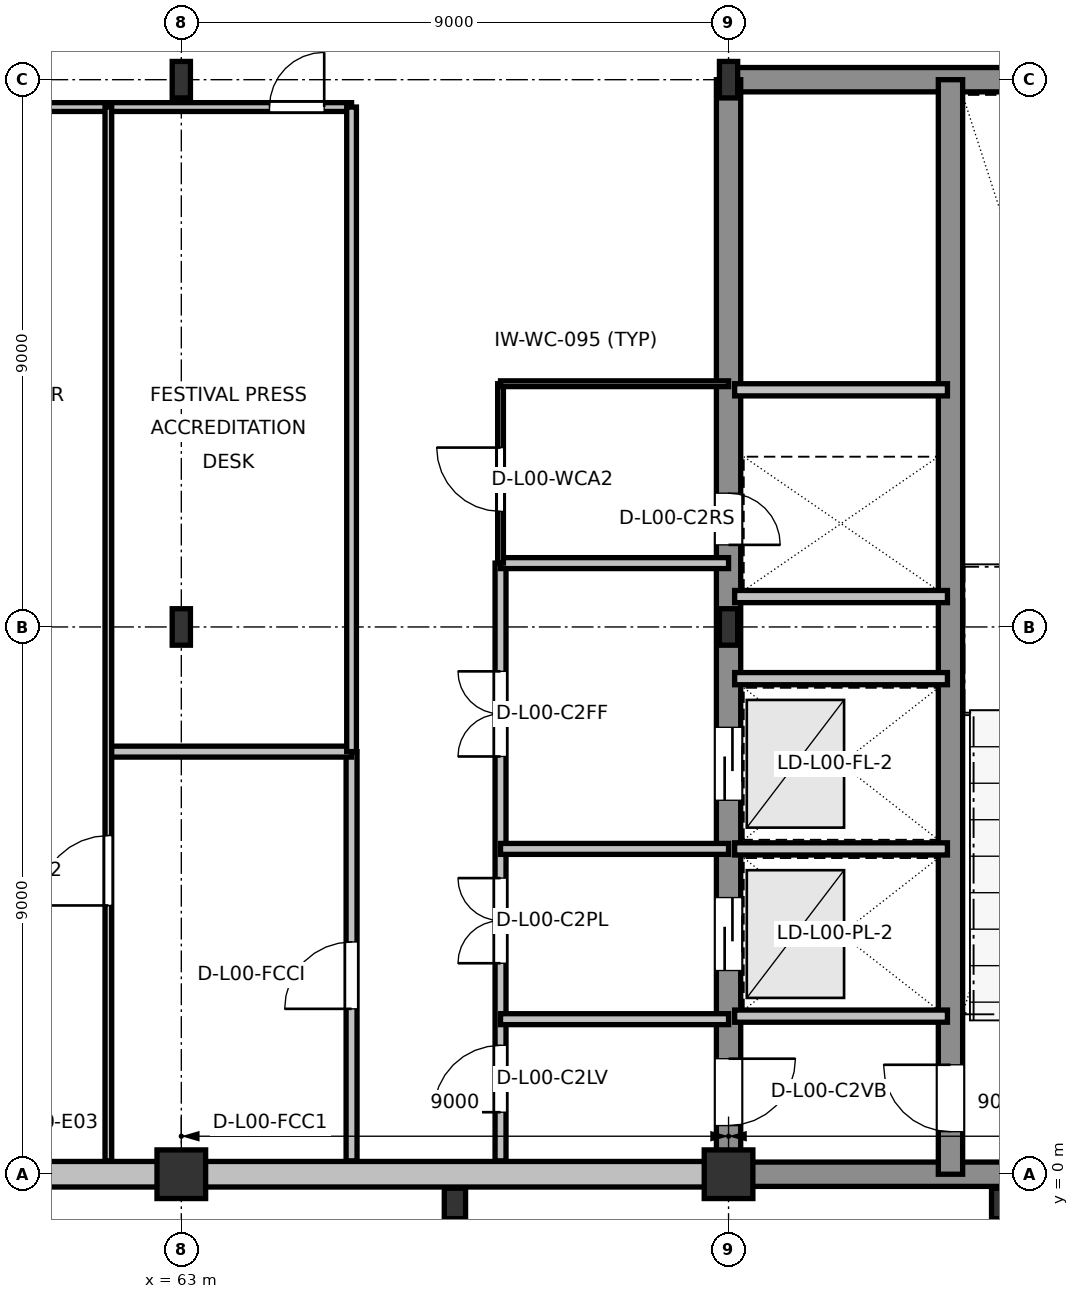
"""IFC4 building model, lengths in metres.
Left out: names, types, materials, properties, quantities, classifications, styles, units other than length and angle.
Written with IfcOpenShell. Run it as: python <this file> out.ifc"""

import sys

from ifc_helpers import new_model, si_unit, direction, frame, frame_2d, origin, origin_2d, place, context, subcontext, project, spatial, rectangle, i_section, extrude, element, fill, save


model = new_model("IFC4")
c1 = context("Model", 3, precision=1e-05, world=origin(), true_north=direction((0.0, 1.0)))
c2 = subcontext(c1, "Body", "Model", "MODEL_VIEW")
j1 = project(units=[si_unit("LENGTHUNIT", "METRE"), si_unit("PLANEANGLEUNIT", "RADIAN")], contexts=[c1])
p1 = place(None, origin())
s1 = spatial("IfcSite", under=j1, at=p1, CompositionType="ELEMENT")
p2 = place(p1, origin())
s2 = spatial("IfcBuilding", under=s1, at=p2, CompositionType="ELEMENT")
p3 = place(p2, origin())
s3 = spatial("IfcBuildingStorey", under=s2, at=p3, CompositionType="ELEMENT", Elevation=0.0)
for number, where, z_axis, x_axis in (
    (1, (67.5, -0.48, 0.0), (0.0, 0.0, 1.0), (1.0, 0.0, 0.0)),
    (2, (76.5, -0.48, 0.0), (0.0, 0.0, 1.0), (1.0, 0.0, 0.0)),
):
    element("IfcColumn", number, at=place(p3, frame(where, z_axis=z_axis, x_axis=x_axis)), inside=s3, PredefinedType="PILASTER", context=c2, shape_type="SweptSolid", body=[
        extrude(rectangle(XDim=0.35, YDim=0.5, at=origin_2d()), origin(), (0.0, 0.0, 1.0), 5.4),
    ])
p4 = place(p3, frame((63.0, 0.0, 0.0), z_axis=(0.0, 0.0, 1.0), x_axis=(1.0, 0.0, 0.0)))
e3 = element("IfcColumn", 3, at=p4, inside=s3, PredefinedType="COLUMN", context=c2, shape_type="SweptSolid", body=[
    extrude(rectangle(XDim=0.8, YDim=0.8, at=origin_2d()), origin(), (0.0, 0.0, 1.0), 5.4),
])
for number, where, z_axis, x_axis in (
    (4, (63.0, 9.0, 0.0), (0.0, 0.0, 1.0), (1.0, 0.0, 0.0)),
    (5, (63.0, 18.0, 0.0), (0.0, 0.0, 1.0), (1.0, 0.0, 0.0)),
):
    element("IfcColumn", number, at=place(p3, frame(where, z_axis=z_axis, x_axis=x_axis)), inside=s3, PredefinedType="COLUMN", context=c2, shape_type="SweptSolid", body=[
        extrude(i_section(OverallWidth=0.3, OverallDepth=0.6, WebThickness=0.015, FlangeThickness=0.03, at=origin_2d()), origin(), (0.0, 0.0, 1.0), 5.4),
    ])
p5 = place(p3, frame((72.0, 0.0, 0.0), z_axis=(0.0, 0.0, 1.0), x_axis=(1.0, 0.0, 0.0)))
e6 = element("IfcColumn", 6, at=p5, inside=s3, PredefinedType="COLUMN", context=c2, shape_type="SweptSolid", body=[
    extrude(rectangle(XDim=0.8, YDim=0.8, at=origin_2d()), origin(), (0.0, 0.0, 1.0), 5.4),
])
for number, where, z_axis, x_axis in (
    (7, (72.0, 9.0, 0.0), (0.0, 0.0, 1.0), (1.0, 0.0, 0.0)),
    (8, (72.0, 18.0, 0.0), (0.0, 0.0, 1.0), (1.0, 0.0, 0.0)),
):
    element("IfcColumn", number, at=place(p3, frame(where, z_axis=z_axis, x_axis=x_axis)), inside=s3, PredefinedType="COLUMN", context=c2, shape_type="SweptSolid", body=[
        extrude(i_section(OverallWidth=0.3, OverallDepth=0.6, WebThickness=0.015, FlangeThickness=0.03, at=origin_2d()), origin(), (0.0, 0.0, 1.0), 5.4),
    ])
p6 = place(p3, frame((54.385, 0.0, 0.0), z_axis=(0.0, 0.0, 1.0), x_axis=(1.0, 0.0, 0.0)))
e9 = element("IfcWall", 9, at=p6, inside=s3, PredefinedType="STANDARD", context=c2, shape_type="SweptSolid", body=[
    extrude(rectangle(XDim=8.23, YDim=0.42, at=frame_2d((4.115, 0.0))), origin(), (0.0, 0.0, 1.0), 3.79),
])
p7 = place(p6, frame((5.465, 0.0, 0.0)))
e10 = element("IfcOpeningElement", 10, at=p7, cuts=e9, PredefinedType="OPENING", context=c2, shape_type="SweptSolid", body=[
    extrude(rectangle(XDim=1.9, YDim=2.5, at=frame_2d((0.95, 1.25))), frame((0.0, 0.22, 0.0), z_axis=(0.0, -1.0, 0.0), x_axis=(1.0, 0.0, 0.0)), (0.0, 0.0, 1.0), 0.44),
])
p8 = place(p3, frame((63.385, 0.0, 0.0), z_axis=(0.0, 0.0, 1.0), x_axis=(1.0, 0.0, 0.0)))
e11 = element("IfcWall", 11, at=p8, inside=s3, PredefinedType="STANDARD", context=c2, shape_type="SweptSolid", body=[
    extrude(rectangle(XDim=8.23, YDim=0.42, at=frame_2d((4.115, 0.0))), origin(), (0.0, 0.0, 1.0), 4.795),
])
p9 = place(p8, frame((0.45, 0.0, 0.0)))
e12 = element("IfcOpeningElement", 12, at=p9, cuts=e11, PredefinedType="OPENING", context=c2, shape_type="SweptSolid", body=[
    extrude(rectangle(XDim=1.25, YDim=2.2, at=frame_2d((0.625, 1.1))), frame((0.0, 0.22, 0.0), z_axis=(0.0, -1.0, 0.0), x_axis=(1.0, 0.0, 0.0)), (0.0, 0.0, 1.0), 0.44),
])
p10 = place(p3, frame((72.0, 0.0, 0.0), z_axis=(0.0, 0.0, 1.0), x_axis=(1.0, 0.0, 0.0)))
e13 = element("IfcWall", 13, at=p10, inside=s3, PredefinedType="SHEAR", context=c2, shape_type="SweptSolid", body=[
    extrude(rectangle(XDim=9.0, YDim=0.4, at=frame_2d((4.5, 0.0))), origin(), (0.0, 0.0, 1.0), 5.16),
])
p11 = place(p10, frame((5.4, 0.0, 0.0)))
e14 = element("IfcOpeningElement", 14, at=p11, cuts=e13, PredefinedType="OPENING", context=c2, shape_type="SweptSolid", body=[
    extrude(rectangle(XDim=1.8, YDim=2.35, at=frame_2d((0.9, 1.175))), frame((0.0, 0.21, 0.0), z_axis=(0.0, -1.0, 0.0), x_axis=(1.0, 0.0, 0.0)), (0.0, 0.0, 1.0), 0.42),
])
p12 = place(p3, frame((81.0, 18.0, 0.0), z_axis=(0.0, 0.0, 1.0), x_axis=(-1.0, 0.0, 0.0)))
e15 = element("IfcWall", 15, at=p12, inside=s3, PredefinedType="SHEAR", context=c2, shape_type="SweptSolid", body=[
    extrude(rectangle(XDim=9.0, YDim=0.4, at=frame_2d((4.5, 0.0))), origin(), (0.0, 0.0, 1.0), 5.16),
])
p13 = place(p3, frame((72.0, 18.0, 0.0), z_axis=(0.0, 0.0, 1.0), x_axis=(0.0, -1.0, 0.0)))
e16 = element("IfcWall", 16, at=p13, inside=s3, PredefinedType="SHEAR", context=c2, shape_type="SweptSolid", body=[
    extrude(rectangle(XDim=18.0, YDim=0.4, at=frame_2d((9.0, 0.0))), origin(), (0.0, 0.0, 1.0), 5.16),
])
p14 = place(p13, frame((16.1, 0.0, 0.0)))
e17 = element("IfcOpeningElement", 17, at=p14, cuts=e16, PredefinedType="OPENING", context=c2, shape_type="SweptSolid", body=[
    extrude(rectangle(XDim=1.1, YDim=2.16, at=frame_2d((0.55, 1.08))), frame((0.0, 0.21, 0.0), z_axis=(0.0, -1.0, 0.0), x_axis=(1.0, 0.0, 0.0)), (0.0, 0.0, 1.0), 0.42),
])
p15 = place(p13, frame((13.45, 0.0, 0.0)))
e18 = element("IfcOpeningElement", 18, at=p15, cuts=e16, PredefinedType="OPENING", context=c2, shape_type="SweptSolid", body=[
    extrude(rectangle(XDim=1.2, YDim=2.2, at=frame_2d((0.6, 1.1))), frame((0.0, 0.21, 0.0), z_axis=(0.0, -1.0, 0.0), x_axis=(1.0, 0.0, 0.0)), (0.0, 0.0, 1.0), 0.42),
])
p16 = place(p13, frame((10.65, 0.0, 0.0)))
e19 = element("IfcOpeningElement", 19, at=p16, cuts=e16, PredefinedType="OPENING", context=c2, shape_type="SweptSolid", body=[
    extrude(rectangle(XDim=1.2, YDim=2.2, at=frame_2d((0.6, 1.1))), frame((0.0, 0.21, 0.0), z_axis=(0.0, -1.0, 0.0), x_axis=(1.0, 0.0, 0.0)), (0.0, 0.0, 1.0), 0.42),
])
p17 = place(p13, frame((6.8, 0.0, 0.0)))
e20 = element("IfcOpeningElement", 20, at=p17, cuts=e16, PredefinedType="OPENING", context=c2, shape_type="SweptSolid", body=[
    extrude(rectangle(XDim=0.85, YDim=2.1, at=frame_2d((0.425, 1.05))), frame((0.0, 0.21, 0.0), z_axis=(0.0, -1.0, 0.0), x_axis=(1.0, 0.0, 0.0)), (0.0, 0.0, 1.0), 0.42),
])
p18 = place(p3, frame((75.65, 0.0, 0.0), z_axis=(0.0, 0.0, 1.0), x_axis=(0.0, 1.0, 0.0)))
e21 = element("IfcWall", 21, at=p18, inside=s3, PredefinedType="SHEAR", context=c2, shape_type="SweptSolid", body=[
    extrude(rectangle(XDim=18.0, YDim=0.4, at=frame_2d((9.0, 0.0))), origin(), (0.0, 0.0, 1.0), 5.16),
])
p19 = place(p18, frame((0.7, 0.0, 0.0)))
e22 = element("IfcOpeningElement", 22, at=p19, cuts=e21, PredefinedType="OPENING", context=c2, shape_type="SweptSolid", body=[
    extrude(rectangle(XDim=1.1, YDim=2.16, at=frame_2d((0.55, 1.08))), frame((0.0, 0.21, 0.0), z_axis=(0.0, -1.0, 0.0), x_axis=(1.0, 0.0, 0.0)), (0.0, 0.0, 1.0), 0.42),
])
for number, where, z_axis, x_axis in (
    (23, (72.1, 2.6, 0.0), (0.0, 0.0, 1.0), (1.0, 0.0, 0.0)),
    (24, (72.1, 5.35, 0.0), (0.0, 0.0, 1.0), (1.0, 0.0, 0.0)),
    (25, (72.1, 8.15, 0.0), (0.0, 0.0, 1.0), (1.0, 0.0, 0.0)),
    (26, (72.1, 9.5, 0.0), (0.0, 0.0, 1.0), (1.0, 0.0, 0.0)),
    (27, (72.1, 12.9, 0.0), (0.0, 0.0, 1.0), (1.0, 0.0, 0.0)),
):
    element("IfcWall", number, at=place(p3, frame(where, z_axis=z_axis, x_axis=x_axis)), inside=s3, PredefinedType="PARTITIONING", context=c2, shape_type="SweptSolid", body=[
        extrude(rectangle(XDim=3.5, YDim=0.2, at=frame_2d((1.75, 0.0))), origin(), (0.0, 0.0, 1.0), 5.16),
    ])
p20 = place(p3, frame((68.25, 0.22, 0.0), z_axis=(0.0, 0.0, 1.0), x_axis=(0.0, 1.0, 0.0)))
e28 = element("IfcWall", 28, at=p20, inside=s3, PredefinedType="PARTITIONING", context=c2, shape_type="SweptSolid", body=[
    extrude(rectangle(XDim=9.83, YDim=0.18, at=frame_2d((4.915, 0.0))), origin(), (0.0, 0.0, 1.0), 5.16),
])
p21 = place(p20, frame((0.8, 0.0, 0.0)))
e29 = element("IfcOpeningElement", 29, at=p21, cuts=e28, PredefinedType="OPENING", context=c2, shape_type="SweptSolid", body=[
    extrude(rectangle(XDim=1.1, YDim=2.16, at=frame_2d((0.55, 1.08))), frame((0.0, 0.1, 0.0), z_axis=(0.0, -1.0, 0.0), x_axis=(1.0, 0.0, 0.0)), (0.0, 0.0, 1.0), 0.2),
])
p22 = place(p20, frame((3.25, 0.0, 0.0)))
e30 = element("IfcOpeningElement", 30, at=p22, cuts=e28, PredefinedType="OPENING", context=c2, shape_type="SweptSolid", body=[
    extrude(rectangle(XDim=1.4, YDim=2.2, at=frame_2d((0.7, 1.1))), frame((0.0, 0.1, 0.0), z_axis=(0.0, -1.0, 0.0), x_axis=(1.0, 0.0, 0.0)), (0.0, 0.0, 1.0), 0.2),
])
p23 = place(p20, frame((6.65, 0.0, 0.0)))
e31 = element("IfcOpeningElement", 31, at=p23, cuts=e28, PredefinedType="OPENING", context=c2, shape_type="SweptSolid", body=[
    extrude(rectangle(XDim=1.4, YDim=2.2, at=frame_2d((0.7, 1.1))), frame((0.0, 0.1, 0.0), z_axis=(0.0, -1.0, 0.0), x_axis=(1.0, 0.0, 0.0)), (0.0, 0.0, 1.0), 0.2),
])
for number, where, z_axis, x_axis in (
    (32, (68.25, 2.55, 0.0), (0.0, 0.0, 1.0), (1.0, 0.0, 0.0)),
    (33, (68.25, 5.35, 0.0), (0.0, 0.0, 1.0), (1.0, 0.0, 0.0)),
    (34, (68.25, 10.05, 0.0), (0.0, 0.0, 1.0), (1.0, 0.0, 0.0)),
):
    element("IfcWall", number, at=place(p3, frame(where, z_axis=z_axis, x_axis=x_axis)), inside=s3, PredefinedType="PARTITIONING", context=c2, shape_type="SweptSolid", body=[
        extrude(rectangle(XDim=3.75, YDim=0.18, at=frame_2d((1.875, 0.0))), origin(), (0.0, 0.0, 1.0), 5.16),
    ])
p24 = place(p3, frame((68.25, 10.05, 0.0), z_axis=(0.0, 0.0, 1.0), x_axis=(0.0, 1.0, 0.0)))
e35 = element("IfcWall", 35, at=p24, inside=s3, PredefinedType="PARTITIONING", context=c2, shape_type="SweptSolid", body=[
    extrude(rectangle(XDim=2.95, YDim=0.095, at=frame_2d((1.475, 0.0))), origin(), (0.0, 0.0, 1.0), 5.16),
])
p25 = place(p24, frame((0.85, 0.0, 0.0)))
e36 = element("IfcOpeningElement", 36, at=p25, cuts=e35, PredefinedType="OPENING", context=c2, shape_type="SweptSolid", body=[
    extrude(rectangle(XDim=1.05, YDim=2.13, at=frame_2d((0.525, 1.065))), frame((0.0, 0.057, 0.0), z_axis=(0.0, -1.0, 0.0), x_axis=(1.0, 0.0, 0.0)), (0.0, 0.0, 1.0), 0.115),
])
p26 = place(p3, frame((68.25, 13.0, 0.0), z_axis=(0.0, 0.0, 1.0), x_axis=(1.0, 0.0, 0.0)))
e37 = element("IfcWall", 37, at=p26, inside=s3, PredefinedType="PARTITIONING", context=c2, shape_type="SweptSolid", body=[
    extrude(rectangle(XDim=3.75, YDim=0.095, at=frame_2d((1.875, 0.0))), origin(), (0.0, 0.0, 1.0), 5.16),
])
p27 = place(p3, frame((65.8, 0.22, 0.0), z_axis=(0.0, 0.0, 1.0), x_axis=(0.0, 1.0, 0.0)))
e38 = element("IfcWall", 38, at=p27, inside=s3, PredefinedType="PARTITIONING", context=c2, shape_type="SweptSolid", body=[
    extrude(rectangle(XDim=6.73, YDim=0.18, at=frame_2d((3.365, 0.0))), origin(), (0.0, 0.0, 1.0), 5.16),
])
p28 = place(p27, frame((2.5, 0.0, 0.0)))
e39 = element("IfcOpeningElement", 39, at=p28, cuts=e38, PredefinedType="OPENING", context=c2, shape_type="SweptSolid", body=[
    extrude(rectangle(XDim=1.1, YDim=2.16, at=frame_2d((0.55, 1.08))), frame((0.0, 0.1, 0.0), z_axis=(0.0, -1.0, 0.0), x_axis=(1.0, 0.0, 0.0)), (0.0, 0.0, 1.0), 0.2),
])
p29 = place(p3, frame((61.8, 6.95, 0.0), z_axis=(0.0, 0.0, 1.0), x_axis=(1.0, 0.0, 0.0)))
e40 = element("IfcWall", 40, at=p29, inside=s3, PredefinedType="PARTITIONING", context=c2, shape_type="SweptSolid", body=[
    extrude(rectangle(XDim=4.0, YDim=0.18, at=frame_2d((2.0, 0.0))), origin(), (0.0, 0.0, 1.0), 5.16),
])
p30 = place(p3, frame((42.2, 17.55, 0.0), z_axis=(0.0, 0.0, 1.0), x_axis=(1.0, 0.0, 0.0)))
e41 = element("IfcWall", 41, at=p30, inside=s3, PredefinedType="PARTITIONING", context=c2, shape_type="SweptSolid", body=[
    extrude(rectangle(XDim=23.6, YDim=0.145, at=frame_2d((11.8, 0.0))), origin(), (0.0, 0.0, 1.0), 5.16),
])
p31 = place(p30, frame((6.871, 0.0, 0.0)))
e42 = element("IfcOpeningElement", 42, at=p31, cuts=e41, PredefinedType="OPENING", context=c2, shape_type="SweptSolid", body=[
    extrude(rectangle(XDim=1.0, YDim=2.14, at=frame_2d((0.5, 1.07))), frame((0.0, 0.083, 0.0), z_axis=(0.0, -1.0, 0.0), x_axis=(1.0, 0.0, 0.0)), (0.0, 0.0, 1.0), 0.165),
])
p32 = place(p30, frame((15.912, 0.0, 0.0)))
e43 = element("IfcOpeningElement", 43, at=p32, cuts=e41, PredefinedType="OPENING", context=c2, shape_type="SweptSolid", body=[
    extrude(rectangle(XDim=0.95, YDim=2.12, at=frame_2d((0.475, 1.06))), frame((0.0, 0.083, 0.0), z_axis=(0.0, -1.0, 0.0), x_axis=(1.0, 0.0, 0.0)), (0.0, 0.0, 1.0), 0.165),
])
p33 = place(p30, frame((22.25, 0.0, 0.0)))
e44 = element("IfcOpeningElement", 44, at=p33, cuts=e41, PredefinedType="OPENING", context=c2, shape_type="SweptSolid", body=[
    extrude(rectangle(XDim=0.9, YDim=2.1, at=frame_2d((0.45, 1.05))), frame((0.0, 0.083, 0.0), z_axis=(0.0, -1.0, 0.0), x_axis=(1.0, 0.0, 0.0)), (0.0, 0.0, 1.0), 0.165),
])
p34 = place(p3, frame((65.8, 6.95, 0.0), z_axis=(0.0, 0.0, 1.0), x_axis=(0.0, 1.0, 0.0)))
e45 = element("IfcWall", 45, at=p34, inside=s3, PredefinedType="PARTITIONING", context=c2, shape_type="SweptSolid", body=[
    extrude(rectangle(XDim=10.6, YDim=0.16, at=frame_2d((5.3, 0.0))), origin(), (0.0, 0.0, 1.0), 5.16),
])
p35 = place(p3, frame((61.8, 0.22, 0.0), z_axis=(0.0, 0.0, 1.0), x_axis=(0.0, 1.0, 0.0)))
e46 = element("IfcWall", 46, at=p35, inside=s3, PredefinedType="PARTITIONING", context=c2, shape_type="SweptSolid", body=[
    extrude(rectangle(XDim=17.33, YDim=0.11, at=frame_2d((8.665, 0.0))), origin(), (0.0, 0.0, 1.0), 5.16),
])
p36 = place(p35, frame((4.2, 0.0, 0.0)))
e47 = element("IfcOpeningElement", 47, at=p36, cuts=e46, PredefinedType="OPENING", context=c2, shape_type="SweptSolid", body=[
    extrude(rectangle(XDim=1.15, YDim=2.15, at=frame_2d((0.575, 1.075))), frame((0.0, 0.065, 0.0), z_axis=(0.0, -1.0, 0.0), x_axis=(1.0, 0.0, 0.0)), (0.0, 0.0, 1.0), 0.13),
])
p37 = place(p7, frame((1.9, 0.0, 0.0), z_axis=(0.0, 0.0, 1.0), x_axis=(-1.0, 0.0, 0.0)))
e48 = element("IfcDoor", 48, at=p37, inside=s3, OperationType="DOUBLE_DOOR_SINGLE_SWING", PredefinedType="DOOR", context=c2, shape_type="SweptSolid", body=[
    extrude(rectangle(XDim=1.9, YDim=2.5, at=frame_2d((0.95, 1.25))), frame((0.0, 0.025, 0.0), z_axis=(0.0, -1.0, 0.0), x_axis=(1.0, 0.0, 0.0)), (0.0, 0.0, 1.0), 0.05),
])
fill(e10, e48)
p38 = place(p9, frame((1.25, 0.0, 0.0), z_axis=(0.0, 0.0, 1.0), x_axis=(-1.0, 0.0, 0.0)))
e49 = element("IfcDoor", 49, at=p38, inside=s3, OperationType="SINGLE_SWING_LEFT", PredefinedType="DOOR", context=c2, shape_type="SweptSolid", body=[
    extrude(rectangle(XDim=1.25, YDim=2.2, at=frame_2d((0.625, 1.1))), frame((0.0, 0.025, 0.0), z_axis=(0.0, -1.0, 0.0), x_axis=(1.0, 0.0, 0.0)), (0.0, 0.0, 1.0), 0.05),
])
fill(e12, e49)
p39 = place(p19, origin())
e50 = element("IfcDoor", 50, at=p39, inside=s3, OperationType="SINGLE_SWING_RIGHT", PredefinedType="DOOR", context=c2, shape_type="SweptSolid", body=[
    extrude(rectangle(XDim=1.1, YDim=2.16, at=frame_2d((0.55, 1.08))), frame((0.0, 0.025, 0.0), z_axis=(0.0, -1.0, 0.0), x_axis=(1.0, 0.0, 0.0)), (0.0, 0.0, 1.0), 0.05),
])
fill(e22, e50)
p40 = place(p14, origin())
e51 = element("IfcDoor", 51, at=p40, inside=s3, OperationType="SINGLE_SWING_LEFT", PredefinedType="DOOR", context=c2, shape_type="SweptSolid", body=[
    extrude(rectangle(XDim=1.1, YDim=2.16, at=frame_2d((0.55, 1.08))), frame((0.0, 0.025, 0.0), z_axis=(0.0, -1.0, 0.0), x_axis=(1.0, 0.0, 0.0)), (0.0, 0.0, 1.0), 0.05),
])
fill(e17, e51)
p41 = place(p15, origin())
e52 = element("IfcDoor", 52, at=p41, inside=s3, OperationType="SLIDING_TO_LEFT", PredefinedType="DOOR", context=c2, shape_type="SweptSolid", body=[
    extrude(rectangle(XDim=1.2, YDim=2.2, at=frame_2d((0.6, 1.1))), frame((0.0, 0.025, 0.0), z_axis=(0.0, -1.0, 0.0), x_axis=(1.0, 0.0, 0.0)), (0.0, 0.0, 1.0), 0.05),
])
fill(e18, e52)
p42 = place(p16, origin())
e53 = element("IfcDoor", 53, at=p42, inside=s3, OperationType="SLIDING_TO_LEFT", PredefinedType="DOOR", context=c2, shape_type="SweptSolid", body=[
    extrude(rectangle(XDim=1.2, YDim=2.2, at=frame_2d((0.6, 1.1))), frame((0.0, 0.025, 0.0), z_axis=(0.0, -1.0, 0.0), x_axis=(1.0, 0.0, 0.0)), (0.0, 0.0, 1.0), 0.05),
])
fill(e19, e53)
p43 = place(p17, origin())
e54 = element("IfcDoor", 54, at=p43, inside=s3, OperationType="SINGLE_SWING_RIGHT", PredefinedType="DOOR", context=c2, shape_type="SweptSolid", body=[
    extrude(rectangle(XDim=0.85, YDim=2.1, at=frame_2d((0.425, 1.05))), frame((0.0, 0.025, 0.0), z_axis=(0.0, -1.0, 0.0), x_axis=(1.0, 0.0, 0.0)), (0.0, 0.0, 1.0), 0.05),
])
fill(e20, e54)
p44 = place(p21, origin())
e55 = element("IfcDoor", 55, at=p44, inside=s3, OperationType="SINGLE_SWING_LEFT", PredefinedType="DOOR", context=c2, shape_type="SweptSolid", body=[
    extrude(rectangle(XDim=1.1, YDim=2.16, at=frame_2d((0.55, 1.08))), frame((0.0, 0.025, 0.0), z_axis=(0.0, -1.0, 0.0), x_axis=(1.0, 0.0, 0.0)), (0.0, 0.0, 1.0), 0.05),
])
fill(e29, e55)
p45 = place(p22, origin())
e56 = element("IfcDoor", 56, at=p45, inside=s3, OperationType="DOUBLE_DOOR_SINGLE_SWING", PredefinedType="DOOR", context=c2, shape_type="SweptSolid", body=[
    extrude(rectangle(XDim=1.4, YDim=2.2, at=frame_2d((0.7, 1.1))), frame((0.0, 0.025, 0.0), z_axis=(0.0, -1.0, 0.0), x_axis=(1.0, 0.0, 0.0)), (0.0, 0.0, 1.0), 0.05),
])
fill(e30, e56)
p46 = place(p23, origin())
e57 = element("IfcDoor", 57, at=p46, inside=s3, OperationType="DOUBLE_DOOR_SINGLE_SWING", PredefinedType="DOOR", context=c2, shape_type="SweptSolid", body=[
    extrude(rectangle(XDim=1.4, YDim=2.2, at=frame_2d((0.7, 1.1))), frame((0.0, 0.025, 0.0), z_axis=(0.0, -1.0, 0.0), x_axis=(1.0, 0.0, 0.0)), (0.0, 0.0, 1.0), 0.05),
])
fill(e31, e57)
p47 = place(p25, origin())
e58 = element("IfcDoor", 58, at=p47, inside=s3, OperationType="SINGLE_SWING_RIGHT", PredefinedType="DOOR", context=c2, shape_type="SweptSolid", body=[
    extrude(rectangle(XDim=1.05, YDim=2.13, at=frame_2d((0.525, 1.065))), frame((0.0, 0.025, 0.0), z_axis=(0.0, -1.0, 0.0), x_axis=(1.0, 0.0, 0.0)), (0.0, 0.0, 1.0), 0.05),
])
fill(e36, e58)
p48 = place(p28, origin())
e59 = element("IfcDoor", 59, at=p48, inside=s3, OperationType="SINGLE_SWING_LEFT", PredefinedType="DOOR", context=c2, shape_type="SweptSolid", body=[
    extrude(rectangle(XDim=1.1, YDim=2.16, at=frame_2d((0.55, 1.08))), frame((0.0, 0.025, 0.0), z_axis=(0.0, -1.0, 0.0), x_axis=(1.0, 0.0, 0.0)), (0.0, 0.0, 1.0), 0.05),
])
fill(e39, e59)
p49 = place(p36, origin())
e60 = element("IfcDoor", 60, at=p49, inside=s3, OperationType="SINGLE_SWING_LEFT", PredefinedType="DOOR", context=c2, shape_type="SweptSolid", body=[
    extrude(rectangle(XDim=1.15, YDim=2.15, at=frame_2d((0.575, 1.075))), frame((0.0, 0.025, 0.0), z_axis=(0.0, -1.0, 0.0), x_axis=(1.0, 0.0, 0.0)), (0.0, 0.0, 1.0), 0.05),
])
fill(e47, e60)
p50 = place(p33, origin())
e61 = element("IfcDoor", 61, at=p50, inside=s3, OperationType="SINGLE_SWING_RIGHT", PredefinedType="DOOR", context=c2, shape_type="SweptSolid", body=[
    extrude(rectangle(XDim=0.9, YDim=2.1, at=frame_2d((0.45, 1.05))), frame((0.0, 0.025, 0.0), z_axis=(0.0, -1.0, 0.0), x_axis=(1.0, 0.0, 0.0)), (0.0, 0.0, 1.0), 0.05),
])
fill(e44, e61)
save(model, sys.argv[1])
